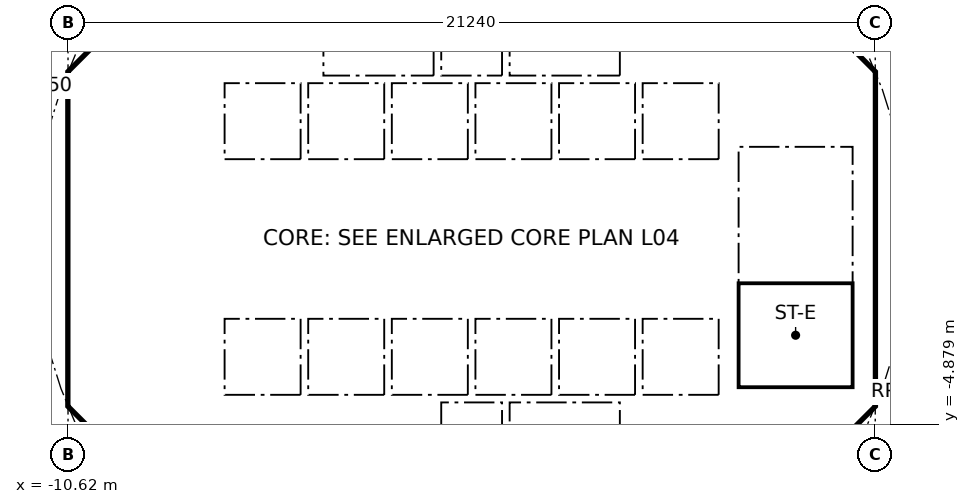
"""IFC4 building model, lengths in metres.
Left out: names, types, materials, properties, quantities, classifications, styles, units other than length and angle.
Written with IfcOpenShell. Run it as: python <this file> out.ifc"""

import sys

from ifc_helpers import new_model, si_unit, direction, frame, frame_2d, origin, place, context, subcontext, project, spatial, polyline, rectangle, outline, extrude, element, fill, save


model = new_model("IFC4")
c1 = context("Model", 3, precision=1e-05, world=origin(), true_north=direction((0.0, 1.0)))
c2 = subcontext(c1, "Body", "Model", "MODEL_VIEW")
j1 = project(units=[si_unit("LENGTHUNIT", "METRE"), si_unit("PLANEANGLEUNIT", "RADIAN")], contexts=[c1])
p1 = place(None, origin())
s1 = spatial("IfcSite", under=j1, at=p1, CompositionType="ELEMENT")
p2 = place(p1, origin())
s2 = spatial("IfcBuilding", under=s1, at=p2, CompositionType="ELEMENT")
p3 = place(p2, frame((0.0, 0.0, 22.0)))
s3 = spatial("IfcBuildingStorey", under=s2, at=p3, CompositionType="ELEMENT", Elevation=22.0)
p4 = place(p3, frame((9.988, 4.613, 0.0), z_axis=(0.0, 0.0, 1.0), x_axis=(-0.707106781187, 0.707106781187, 0.0)))
e1 = element("IfcWall", 1, at=p4, inside=s3, PredefinedType="SHEAR", context=c2, shape_type="SweptSolid", body=[
    extrude(rectangle(XDim=7.602, YDim=0.6, at=frame_2d((3.801, 0.0))), origin(), (0.0, 0.0, 1.0), 4.74),
])
p5 = place(p4, frame((3.201, 0.0, 0.0)))
e2 = element("IfcOpeningElement", 2, at=p5, cuts=e1, PredefinedType="OPENING", context=c2, shape_type="SweptSolid", body=[
    extrude(rectangle(XDim=1.2, YDim=2.1, at=frame_2d((0.6, 1.05))), frame((0.0, 0.31, 0.0), z_axis=(0.0, -1.0, 0.0), x_axis=(1.0, 0.0, 0.0)), (0.0, 0.0, 1.0), 0.62),
])
p6 = place(p3, frame((-4.613, 9.988, 0.0), z_axis=(0.0, 0.0, 1.0), x_axis=(-0.707106781187, -0.707106781187, 0.0)))
e3 = element("IfcWall", 3, at=p6, inside=s3, PredefinedType="SHEAR", context=c2, shape_type="SweptSolid", body=[
    extrude(rectangle(XDim=7.602, YDim=0.6, at=frame_2d((3.801, 0.0))), origin(), (0.0, 0.0, 1.0), 4.74),
])
p7 = place(p6, frame((0.351, 0.0, 0.0)))
e4 = element("IfcOpeningElement", 4, at=p7, cuts=e3, PredefinedType="OPENING", context=c2, shape_type="SweptSolid", body=[
    extrude(rectangle(XDim=1.1, YDim=2.1, at=frame_2d((0.55, 1.05))), frame((0.0, 0.31, 0.0), z_axis=(0.0, -1.0, 0.0), x_axis=(1.0, 0.0, 0.0)), (0.0, 0.0, 1.0), 0.62),
])
p8 = place(p3, frame((-10.325, 3.801, 0.0), z_axis=(0.0, 0.0, 1.0), x_axis=(0.0, -1.0, 0.0)))
e5 = element("IfcWall", 5, at=p8, inside=s3, PredefinedType="SHEAR", context=c2, shape_type="SweptSolid", body=[
    extrude(rectangle(XDim=7.602, YDim=0.6, at=frame_2d((3.801, 0.0))), origin(), (0.0, 0.0, 1.0), 4.74),
])
p9 = place(p8, frame((0.651, 0.0, 0.0)))
e6 = element("IfcOpeningElement", 6, at=p9, cuts=e5, PredefinedType="OPENING", context=c2, shape_type="SweptSolid", body=[
    extrude(rectangle(XDim=1.5, YDim=2.1, at=frame_2d((0.75, 1.05))), frame((0.0, 0.31, 0.0), z_axis=(0.0, -1.0, 0.0), x_axis=(1.0, 0.0, 0.0)), (0.0, 0.0, 1.0), 0.62),
])
p10 = place(p8, frame((5.451, 0.0, 0.0)))
e7 = element("IfcOpeningElement", 7, at=p10, cuts=e5, PredefinedType="OPENING", context=c2, shape_type="SweptSolid", body=[
    extrude(rectangle(XDim=1.5, YDim=2.1, at=frame_2d((0.75, 1.05))), frame((0.0, 0.31, 0.0), z_axis=(0.0, -1.0, 0.0), x_axis=(1.0, 0.0, 0.0)), (0.0, 0.0, 1.0), 0.62),
])
p11 = place(p3, frame((-9.988, -4.613, 0.0), z_axis=(0.0, 0.0, 1.0), x_axis=(0.707106781187, -0.707106781187, 0.0)))
e8 = element("IfcWall", 8, at=p11, inside=s3, PredefinedType="SHEAR", context=c2, shape_type="SweptSolid", body=[
    extrude(rectangle(XDim=7.602, YDim=0.6, at=frame_2d((3.801, 0.0))), origin(), (0.0, 0.0, 1.0), 4.74),
])
p12 = place(p11, frame((6.151, 0.0, 0.0)))
e9 = element("IfcOpeningElement", 9, at=p12, cuts=e8, PredefinedType="OPENING", context=c2, shape_type="SweptSolid", body=[
    extrude(rectangle(XDim=1.1, YDim=2.1, at=frame_2d((0.55, 1.05))), frame((0.0, 0.31, 0.0), z_axis=(0.0, -1.0, 0.0), x_axis=(1.0, 0.0, 0.0)), (0.0, 0.0, 1.0), 0.62),
])
p13 = place(p3, frame((4.613, -9.988, 0.0), z_axis=(0.0, 0.0, 1.0), x_axis=(0.707106781187, 0.707106781187, 0.0)))
e10 = element("IfcWall", 10, at=p13, inside=s3, PredefinedType="SHEAR", context=c2, shape_type="SweptSolid", body=[
    extrude(rectangle(XDim=7.602, YDim=0.6, at=frame_2d((3.801, 0.0))), origin(), (0.0, 0.0, 1.0), 4.74),
])
p14 = place(p13, frame((3.201, 0.0, 0.0)))
e11 = element("IfcOpeningElement", 11, at=p14, cuts=e10, PredefinedType="OPENING", context=c2, shape_type="SweptSolid", body=[
    extrude(rectangle(XDim=1.2, YDim=2.1, at=frame_2d((0.6, 1.05))), frame((0.0, 0.31, 0.0), z_axis=(0.0, -1.0, 0.0), x_axis=(1.0, 0.0, 0.0)), (0.0, 0.0, 1.0), 0.62),
])
p15 = place(p3, frame((-5.8, 4.3, 0.0), z_axis=(0.0, 0.0, 1.0), x_axis=(0.0, 1.0, 0.0)))
e12 = element("IfcWall", 12, at=p15, inside=s3, PredefinedType="PARTITIONING", context=c2, shape_type="SweptSolid", body=[
    extrude(rectangle(XDim=3.927, YDim=0.15, at=frame_2d((1.963, 0.0))), origin(), (0.0, 0.0, 1.0), 4.74),
])
p16 = place(p15, frame((0.413, 0.0, 0.0)))
e13 = element("IfcOpeningElement", 13, at=p16, cuts=e12, PredefinedType="OPENING", context=c2, shape_type="SweptSolid", body=[
    extrude(rectangle(XDim=0.9, YDim=2.1, at=frame_2d((0.45, 1.05))), frame((0.0, 0.085, 0.0), z_axis=(0.0, -1.0, 0.0), x_axis=(1.0, 0.0, 0.0)), (0.0, 0.0, 1.0), 0.17),
])
p17 = place(p15, frame((2.489, 0.0, 0.0)))
e14 = element("IfcOpeningElement", 14, at=p17, cuts=e12, PredefinedType="OPENING", context=c2, shape_type="SweptSolid", body=[
    extrude(rectangle(XDim=0.9, YDim=2.1, at=frame_2d((0.45, 1.05))), frame((0.0, 0.085, 0.0), z_axis=(0.0, -1.0, 0.0), x_axis=(1.0, 0.0, 0.0)), (0.0, 0.0, 1.0), 0.17),
])
p18 = place(p3, frame((4.0, 4.3, 0.0), z_axis=(0.0, 0.0, 1.0), x_axis=(0.0, 1.0, 0.0)))
e15 = element("IfcWall", 15, at=p18, inside=s3, PredefinedType="SOLIDWALL", context=c2, shape_type="SweptSolid", body=[
    extrude(rectangle(XDim=2.2, YDim=0.2, at=frame_2d((1.1, 0.0))), origin(), (0.0, 0.0, 1.0), 4.74),
])
p19 = place(p18, frame((0.55, 0.0, 0.0)))
e16 = element("IfcOpeningElement", 16, at=p19, cuts=e15, PredefinedType="OPENING", context=c2, shape_type="SweptSolid", body=[
    extrude(rectangle(XDim=1.1, YDim=2.1, at=frame_2d((0.55, 1.05))), frame((0.0, 0.11, 0.0), z_axis=(0.0, -1.0, 0.0), x_axis=(1.0, 0.0, 0.0)), (0.0, 0.0, 1.0), 0.22),
])
p20 = place(p3, frame((-4.0, 4.3, 0.0), z_axis=(0.0, 0.0, 1.0), x_axis=(0.0, 1.0, 0.0)))
e17 = element("IfcWall", 17, at=p20, inside=s3, PredefinedType="SOLIDWALL", context=c2, shape_type="SweptSolid", body=[
    extrude(rectangle(XDim=2.2, YDim=0.2, at=frame_2d((1.1, 0.0))), origin(), (0.0, 0.0, 1.0), 4.74),
])
p21 = place(p20, frame((0.55, 0.0, 0.0)))
e18 = element("IfcOpeningElement", 18, at=p21, cuts=e17, PredefinedType="OPENING", context=c2, shape_type="SweptSolid", body=[
    extrude(rectangle(XDim=1.1, YDim=2.1, at=frame_2d((0.55, 1.05))), frame((0.0, 0.11, 0.0), z_axis=(0.0, -1.0, 0.0), x_axis=(1.0, 0.0, 0.0)), (0.0, 0.0, 1.0), 0.22),
])
p22 = place(p3, frame((-6.7, 2.0, 0.0), z_axis=(0.0, 0.0, 1.0), x_axis=(1.0, 0.0, 0.0)))
e19 = element("IfcWall", 19, at=p22, inside=s3, PredefinedType="SOLIDWALL", context=c2, shape_type="SweptSolid", body=[
    extrude(rectangle(XDim=13.4, YDim=0.2, at=frame_2d((6.7, 0.0))), origin(), (0.0, 0.0, 1.0), 4.74),
])
p23 = place(p22, frame((0.65, 0.0, 0.0)))
e20 = element("IfcOpeningElement", 20, at=p23, cuts=e19, PredefinedType="OPENING", context=c2, shape_type="SweptSolid", body=[
    extrude(rectangle(XDim=1.1, YDim=2.1, at=frame_2d((0.55, 1.05))), frame((0.0, 0.11, 0.0), z_axis=(0.0, -1.0, 0.0), x_axis=(1.0, 0.0, 0.0)), (0.0, 0.0, 1.0), 0.22),
])
p24 = place(p22, frame((2.85, 0.0, 0.0)))
e21 = element("IfcOpeningElement", 21, at=p24, cuts=e19, PredefinedType="OPENING", context=c2, shape_type="SweptSolid", body=[
    extrude(rectangle(XDim=1.1, YDim=2.1, at=frame_2d((0.55, 1.05))), frame((0.0, 0.11, 0.0), z_axis=(0.0, -1.0, 0.0), x_axis=(1.0, 0.0, 0.0)), (0.0, 0.0, 1.0), 0.22),
])
p25 = place(p22, frame((5.05, 0.0, 0.0)))
e22 = element("IfcOpeningElement", 22, at=p25, cuts=e19, PredefinedType="OPENING", context=c2, shape_type="SweptSolid", body=[
    extrude(rectangle(XDim=1.1, YDim=2.1, at=frame_2d((0.55, 1.05))), frame((0.0, 0.11, 0.0), z_axis=(0.0, -1.0, 0.0), x_axis=(1.0, 0.0, 0.0)), (0.0, 0.0, 1.0), 0.22),
])
p26 = place(p3, frame((6.7, 4.0, 0.0), z_axis=(0.0, 0.0, 1.0), x_axis=(1.0, 0.0, 0.0)))
e23 = element("IfcWall", 23, at=p26, inside=s3, PredefinedType="SOLIDWALL", context=c2, shape_type="SweptSolid", body=[
    extrude(rectangle(XDim=3.325, YDim=0.2, at=frame_2d((1.662, 0.0))), origin(), (0.0, 0.0, 1.0), 4.74),
])
p27 = place(p26, frame((1.25, 0.0, 0.0)))
e24 = element("IfcOpeningElement", 24, at=p27, cuts=e23, PredefinedType="OPENING", context=c2, shape_type="SweptSolid", body=[
    extrude(rectangle(XDim=1.1, YDim=2.1, at=frame_2d((0.55, 1.05))), frame((0.0, 0.11, 0.0), z_axis=(0.0, -1.0, 0.0), x_axis=(1.0, 0.0, 0.0)), (0.0, 0.0, 1.0), 0.22),
])
p28 = place(p3, frame((-5.8, -8.227, 0.0), z_axis=(0.0, 0.0, 1.0), x_axis=(0.0, 1.0, 0.0)))
e25 = element("IfcWall", 25, at=p28, inside=s3, PredefinedType="PARTITIONING", context=c2, shape_type="SweptSolid", body=[
    extrude(rectangle(XDim=3.927, YDim=0.15, at=frame_2d((1.963, 0.0))), origin(), (0.0, 0.0, 1.0), 4.74),
])
p29 = place(p28, frame((2.615, 0.0, 0.0)))
e26 = element("IfcOpeningElement", 26, at=p29, cuts=e25, PredefinedType="OPENING", context=c2, shape_type="SweptSolid", body=[
    extrude(rectangle(XDim=0.9, YDim=2.1, at=frame_2d((0.45, 1.05))), frame((0.0, 0.085, 0.0), z_axis=(0.0, -1.0, 0.0), x_axis=(1.0, 0.0, 0.0)), (0.0, 0.0, 1.0), 0.17),
])
p30 = place(p28, frame((0.539, 0.0, 0.0)))
e27 = element("IfcOpeningElement", 27, at=p30, cuts=e25, PredefinedType="OPENING", context=c2, shape_type="SweptSolid", body=[
    extrude(rectangle(XDim=0.9, YDim=2.1, at=frame_2d((0.45, 1.05))), frame((0.0, 0.085, 0.0), z_axis=(0.0, -1.0, 0.0), x_axis=(1.0, 0.0, 0.0)), (0.0, 0.0, 1.0), 0.17),
])
p31 = place(p3, frame((4.0, -6.5, 0.0), z_axis=(0.0, 0.0, 1.0), x_axis=(0.0, 1.0, 0.0)))
e28 = element("IfcWall", 28, at=p31, inside=s3, PredefinedType="SOLIDWALL", context=c2, shape_type="SweptSolid", body=[
    extrude(rectangle(XDim=2.2, YDim=0.2, at=frame_2d((1.1, 0.0))), origin(), (0.0, 0.0, 1.0), 4.74),
])
p32 = place(p31, frame((0.55, 0.0, 0.0)))
e29 = element("IfcOpeningElement", 29, at=p32, cuts=e28, PredefinedType="OPENING", context=c2, shape_type="SweptSolid", body=[
    extrude(rectangle(XDim=1.1, YDim=2.1, at=frame_2d((0.55, 1.05))), frame((0.0, 0.11, 0.0), z_axis=(0.0, -1.0, 0.0), x_axis=(1.0, 0.0, 0.0)), (0.0, 0.0, 1.0), 0.22),
])
p33 = place(p3, frame((-4.0, -6.5, 0.0), z_axis=(0.0, 0.0, 1.0), x_axis=(0.0, 1.0, 0.0)))
e30 = element("IfcWall", 30, at=p33, inside=s3, PredefinedType="SOLIDWALL", context=c2, shape_type="SweptSolid", body=[
    extrude(rectangle(XDim=2.2, YDim=0.2, at=frame_2d((1.1, 0.0))), origin(), (0.0, 0.0, 1.0), 4.74),
])
p34 = place(p33, frame((0.65, 0.0, 0.0)))
e31 = element("IfcOpeningElement", 31, at=p34, cuts=e30, PredefinedType="OPENING", context=c2, shape_type="SweptSolid", body=[
    extrude(rectangle(XDim=0.9, YDim=2.1, at=frame_2d((0.45, 1.05))), frame((0.0, 0.11, 0.0), z_axis=(0.0, -1.0, 0.0), x_axis=(1.0, 0.0, 0.0)), (0.0, 0.0, 1.0), 0.22),
])
p35 = place(p3, frame((-6.7, -2.0, 0.0), z_axis=(0.0, 0.0, 1.0), x_axis=(1.0, 0.0, 0.0)))
e32 = element("IfcWall", 32, at=p35, inside=s3, PredefinedType="SOLIDWALL", context=c2, shape_type="SweptSolid", body=[
    extrude(rectangle(XDim=13.4, YDim=0.2, at=frame_2d((6.7, 0.0))), origin(), (0.0, 0.0, 1.0), 4.74),
])
p36 = place(p35, frame((0.65, 0.0, 0.0)))
e33 = element("IfcOpeningElement", 33, at=p36, cuts=e32, PredefinedType="OPENING", context=c2, shape_type="SweptSolid", body=[
    extrude(rectangle(XDim=1.1, YDim=2.1, at=frame_2d((0.55, 1.05))), frame((0.0, 0.11, 0.0), z_axis=(0.0, -1.0, 0.0), x_axis=(1.0, 0.0, 0.0)), (0.0, 0.0, 1.0), 0.22),
])
p37 = place(p35, frame((2.85, 0.0, 0.0)))
e34 = element("IfcOpeningElement", 34, at=p37, cuts=e32, PredefinedType="OPENING", context=c2, shape_type="SweptSolid", body=[
    extrude(rectangle(XDim=1.1, YDim=2.1, at=frame_2d((0.55, 1.05))), frame((0.0, 0.11, 0.0), z_axis=(0.0, -1.0, 0.0), x_axis=(1.0, 0.0, 0.0)), (0.0, 0.0, 1.0), 0.22),
])
p38 = place(p3, origin())
e35 = element("IfcWall", 35, at=p38, inside=s3, PredefinedType="SHEAR", context=c2, shape_type="SweptSolid", body=[
    extrude(outline(polyline([(-10.625, -3.801), (-10.025, -3.801), (-10.025, -4.152), (-9.776, -4.401), (-10.2, -4.825), (-10.625, -4.401), (-10.625, -3.801)])), origin(), (0.0, 0.0, 1.0), 4.74),
])
p39 = place(p3, origin())
e36 = element("IfcWall", 36, at=p39, inside=s3, PredefinedType="SHEAR", context=c2, shape_type="SweptSolid", body=[
    extrude(outline(polyline([(-10.2, 4.825), (-9.776, 4.401), (-10.025, 4.152), (-10.025, 3.801), (-10.625, 3.801), (-10.625, 4.401), (-10.2, 4.825)])), origin(), (0.0, 0.0, 1.0), 4.74),
])
p40 = place(p3, origin())
e37 = element("IfcWall", 37, at=p40, inside=s3, PredefinedType="SHEAR", context=c2, shape_type="SweptSolid", body=[
    extrude(outline(polyline([(9.776, -4.401), (10.025, -4.152), (10.025, -3.801), (10.025, 4.152), (9.776, 4.401), (10.2, 4.825), (10.625, 4.401), (10.625, -4.401), (10.2, -4.825), (9.776, -4.401)])), origin(), (0.0, 0.0, 1.0), 4.74),
])
for number, where, z_axis, x_axis in (
    (38, (-10.025, -4.0, 0.0), (0.0, 0.0, 1.0), (1.0, 0.0, 0.0)),
    (39, (-10.025, 4.0, 0.0), (0.0, 0.0, 1.0), (1.0, 0.0, 0.0)),
):
    element("IfcWall", number, at=place(p3, frame(where, z_axis=z_axis, x_axis=x_axis)), inside=s3, PredefinedType="PARTITIONING", context=c2, shape_type="SweptSolid", body=[
        extrude(rectangle(XDim=3.325, YDim=0.2, at=frame_2d((1.662, 0.0))), origin(), (0.0, 0.0, 1.0), 4.74),
    ])
for number, where, z_axis, x_axis in (
    (40, (-0.9, -6.5, 0.0), (0.0, 0.0, 1.0), (0.0, 1.0, 0.0)),
    (41, (0.9, -6.5, 0.0), (0.0, 0.0, 1.0), (0.0, 1.0, 0.0)),
):
    element("IfcWall", number, at=place(p3, frame(where, z_axis=z_axis, x_axis=x_axis)), inside=s3, PredefinedType="SOLIDWALL", context=c2, shape_type="SweptSolid", body=[
        extrude(rectangle(XDim=2.2, YDim=0.2, at=frame_2d((1.1, 0.0))), origin(), (0.0, 0.0, 1.0), 4.74),
    ])
p41 = place(p3, origin())
e42 = element("IfcWall", 42, at=p41, inside=s3, PredefinedType="SOLIDWALL", context=c2, shape_type="SweptSolid", body=[
    extrude(outline(polyline([(-6.7, -2.1), (-6.5, -2.1), (-6.5, -4.1), (-4.5, -4.1), (-4.5, -2.1), (-4.3, -2.1), (-4.3, -4.1), (-2.3, -4.1), (-2.3, -2.1), (-2.1, -2.1), (-2.1, -4.1), (-0.1, -4.1), (-0.1, -2.1), (0.1, -2.1), (0.1, -4.1), (2.1, -4.1), (2.1, -2.1), (2.3, -2.1), (2.3, -4.1), (4.3, -4.1), (4.3, -2.1), (4.5, -2.1), (4.5, -4.1), (6.5, -4.1), (6.5, -2.1), (6.7, -2.1), (6.7, -4.3), (-6.7, -4.3), (-6.7, -2.1)])), origin(), (0.0, 0.0, 1.0), 4.74),
])
for number, where, z_axis, x_axis in (
    (43, (-0.9, 4.3, 0.0), (0.0, 0.0, 1.0), (0.0, 1.0, 0.0)),
    (44, (0.9, 4.3, 0.0), (0.0, 0.0, 1.0), (0.0, 1.0, 0.0)),
):
    element("IfcWall", number, at=place(p3, frame(where, z_axis=z_axis, x_axis=x_axis)), inside=s3, PredefinedType="SOLIDWALL", context=c2, shape_type="SweptSolid", body=[
        extrude(rectangle(XDim=2.2, YDim=0.2, at=frame_2d((1.1, 0.0))), origin(), (0.0, 0.0, 1.0), 4.74),
    ])
p42 = place(p3, origin())
e45 = element("IfcWall", 45, at=p42, inside=s3, PredefinedType="SOLIDWALL", context=c2, shape_type="SweptSolid", body=[
    extrude(outline(polyline([(-6.5, 2.1), (-6.7, 2.1), (-6.7, 4.3), (6.7, 4.3), (6.7, 2.1), (6.5, 2.1), (6.5, 4.1), (4.5, 4.1), (4.5, 2.1), (4.3, 2.1), (4.3, 4.1), (2.3, 4.1), (2.3, 2.1), (2.1, 2.1), (2.1, 4.1), (0.1, 4.1), (0.1, 2.1), (-0.1, 2.1), (-0.1, 4.1), (-2.1, 4.1), (-2.1, 2.1), (-2.3, 2.1), (-2.3, 4.1), (-4.3, 4.1), (-4.3, 2.1), (-4.5, 2.1), (-4.5, 4.1), (-6.5, 4.1), (-6.5, 2.1)])), origin(), (0.0, 0.0, 1.0), 4.74),
])
p43 = place(p3, origin())
e46 = element("IfcWall", 46, at=p43, inside=s3, PredefinedType="SOLIDWALL", context=c2, shape_type="SweptSolid", body=[
    extrude(outline(polyline([(7.025, -3.9), (6.7, -3.9), (6.7, 3.9), (7.025, 3.9), (7.025, -3.9)])), origin(), (0.0, 0.0, 1.0), 4.74),
])
p44 = place(p3, origin())
e47 = element("IfcWall", 47, at=p44, inside=s3, PredefinedType="SOLIDWALL", context=c2, shape_type="SweptSolid", body=[
    extrude(outline(polyline([(10.025, -4.1), (6.7, -4.1), (6.7, -3.9), (10.025, -3.9), (10.025, -4.1)])), origin(), (0.0, 0.0, 1.0), 4.74),
])
p45 = place(p23, origin())
e48 = element("IfcDoor", 48, at=p45, inside=s3, OperationType="DOUBLE_DOOR_SLIDING", PredefinedType="DOOR", context=c2, shape_type="SweptSolid", body=[
    extrude(rectangle(XDim=1.1, YDim=2.1, at=frame_2d((0.55, 1.05))), frame((0.0, 0.025, 0.0), z_axis=(0.0, -1.0, 0.0), x_axis=(1.0, 0.0, 0.0)), (0.0, 0.0, 1.0), 0.05),
])
fill(e20, e48)
p46 = place(p24, origin())
e49 = element("IfcDoor", 49, at=p46, inside=s3, OperationType="DOUBLE_DOOR_SLIDING", PredefinedType="DOOR", context=c2, shape_type="SweptSolid", body=[
    extrude(rectangle(XDim=1.1, YDim=2.1, at=frame_2d((0.55, 1.05))), frame((0.0, 0.025, 0.0), z_axis=(0.0, -1.0, 0.0), x_axis=(1.0, 0.0, 0.0)), (0.0, 0.0, 1.0), 0.05),
])
fill(e21, e49)
p47 = place(p25, origin())
e50 = element("IfcDoor", 50, at=p47, inside=s3, OperationType="DOUBLE_DOOR_SLIDING", PredefinedType="DOOR", context=c2, shape_type="SweptSolid", body=[
    extrude(rectangle(XDim=1.1, YDim=2.1, at=frame_2d((0.55, 1.05))), frame((0.0, 0.025, 0.0), z_axis=(0.0, -1.0, 0.0), x_axis=(1.0, 0.0, 0.0)), (0.0, 0.0, 1.0), 0.05),
])
fill(e22, e50)
p48 = place(p36, origin())
e51 = element("IfcDoor", 51, at=p48, inside=s3, OperationType="DOUBLE_DOOR_SLIDING", PredefinedType="DOOR", context=c2, shape_type="SweptSolid", body=[
    extrude(rectangle(XDim=1.1, YDim=2.1, at=frame_2d((0.55, 1.05))), frame((0.0, 0.025, 0.0), z_axis=(0.0, -1.0, 0.0), x_axis=(1.0, 0.0, 0.0)), (0.0, 0.0, 1.0), 0.05),
])
fill(e33, e51)
p49 = place(p37, origin())
e52 = element("IfcDoor", 52, at=p49, inside=s3, OperationType="DOUBLE_DOOR_SLIDING", PredefinedType="DOOR", context=c2, shape_type="SweptSolid", body=[
    extrude(rectangle(XDim=1.1, YDim=2.1, at=frame_2d((0.55, 1.05))), frame((0.0, 0.025, 0.0), z_axis=(0.0, -1.0, 0.0), x_axis=(1.0, 0.0, 0.0)), (0.0, 0.0, 1.0), 0.05),
])
fill(e34, e52)
p50 = place(p19, origin())
e53 = element("IfcDoor", 53, at=p50, inside=s3, OperationType="DOUBLE_DOOR_SLIDING", PredefinedType="DOOR", context=c2, shape_type="SweptSolid", body=[
    extrude(rectangle(XDim=1.1, YDim=2.1, at=frame_2d((0.55, 1.05))), frame((0.0, 0.025, 0.0), z_axis=(0.0, -1.0, 0.0), x_axis=(1.0, 0.0, 0.0)), (0.0, 0.0, 1.0), 0.05),
])
fill(e16, e53)
p51 = place(p32, origin())
e54 = element("IfcDoor", 54, at=p51, inside=s3, OperationType="DOUBLE_DOOR_SLIDING", PredefinedType="DOOR", context=c2, shape_type="SweptSolid", body=[
    extrude(rectangle(XDim=1.1, YDim=2.1, at=frame_2d((0.55, 1.05))), frame((0.0, 0.025, 0.0), z_axis=(0.0, -1.0, 0.0), x_axis=(1.0, 0.0, 0.0)), (0.0, 0.0, 1.0), 0.05),
])
fill(e29, e54)
p52 = place(p21, origin())
e55 = element("IfcDoor", 55, at=p52, inside=s3, OperationType="DOUBLE_DOOR_SLIDING", PredefinedType="DOOR", context=c2, shape_type="SweptSolid", body=[
    extrude(rectangle(XDim=1.1, YDim=2.1, at=frame_2d((0.55, 1.05))), frame((0.0, 0.025, 0.0), z_axis=(0.0, -1.0, 0.0), x_axis=(1.0, 0.0, 0.0)), (0.0, 0.0, 1.0), 0.05),
])
fill(e18, e55)
p53 = place(p27, frame((1.1, 0.0, 0.0), x_axis=(-1.0, 0.0, 0.0)))
e56 = element("IfcDoor", 56, at=p53, inside=s3, OperationType="SINGLE_SWING_RIGHT", PredefinedType="DOOR", context=c2, shape_type="SweptSolid", body=[
    extrude(rectangle(XDim=1.1, YDim=2.1, at=frame_2d((0.55, 1.05))), frame((0.0, 0.025, 0.0), z_axis=(0.0, -1.0, 0.0), x_axis=(1.0, 0.0, 0.0)), (0.0, 0.0, 1.0), 0.05),
])
fill(e24, e56)
p54 = place(p16, origin())
e57 = element("IfcDoor", 57, at=p54, inside=s3, OperationType="SINGLE_SWING_RIGHT", PredefinedType="DOOR", context=c2, shape_type="SweptSolid", body=[
    extrude(rectangle(XDim=0.9, YDim=2.1, at=frame_2d((0.45, 1.05))), frame((0.0, 0.025, 0.0), z_axis=(0.0, -1.0, 0.0), x_axis=(1.0, 0.0, 0.0)), (0.0, 0.0, 1.0), 0.05),
])
fill(e13, e57)
p55 = place(p29, origin())
e58 = element("IfcDoor", 58, at=p55, inside=s3, OperationType="SINGLE_SWING_RIGHT", PredefinedType="DOOR", context=c2, shape_type="SweptSolid", body=[
    extrude(rectangle(XDim=0.9, YDim=2.1, at=frame_2d((0.45, 1.05))), frame((0.0, 0.025, 0.0), z_axis=(0.0, -1.0, 0.0), x_axis=(1.0, 0.0, 0.0)), (0.0, 0.0, 1.0), 0.05),
])
fill(e26, e58)
p56 = place(p9, origin())
e59 = element("IfcDoor", 59, at=p56, inside=s3, OperationType="DOUBLE_DOOR_SINGLE_SWING", PredefinedType="DOOR", context=c2, shape_type="SweptSolid", body=[
    extrude(rectangle(XDim=1.5, YDim=2.1, at=frame_2d((0.75, 1.05))), frame((0.0, 0.025, 0.0), z_axis=(0.0, -1.0, 0.0), x_axis=(1.0, 0.0, 0.0)), (0.0, 0.0, 1.0), 0.05),
])
fill(e6, e59)
p57 = place(p10, origin())
e60 = element("IfcDoor", 60, at=p57, inside=s3, OperationType="DOUBLE_DOOR_SINGLE_SWING", PredefinedType="DOOR", context=c2, shape_type="SweptSolid", body=[
    extrude(rectangle(XDim=1.5, YDim=2.1, at=frame_2d((0.75, 1.05))), frame((0.0, 0.025, 0.0), z_axis=(0.0, -1.0, 0.0), x_axis=(1.0, 0.0, 0.0)), (0.0, 0.0, 1.0), 0.05),
])
fill(e7, e60)
save(model, sys.argv[1])
